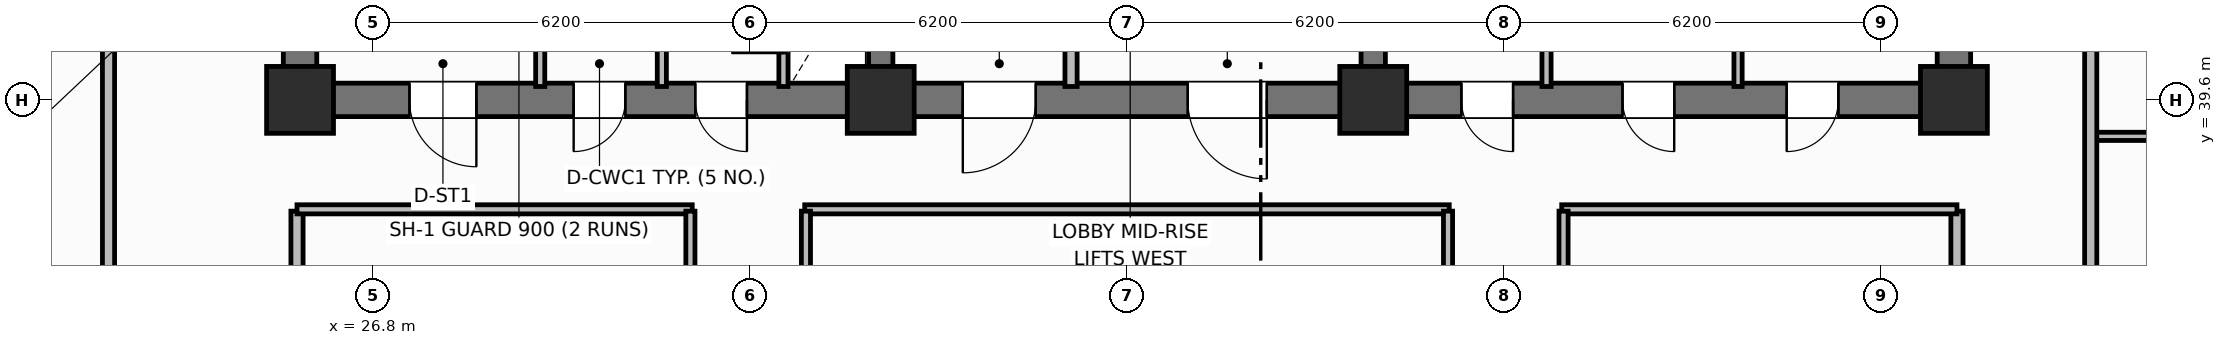
"""IFC4 building model, lengths in metres.
Left out: names, types, materials, properties, quantities, classifications, styles, units other than length and angle.
Written with IfcOpenShell. Run it as: python <this file> out.ifc"""

import sys

from ifc_helpers import new_model, si_unit, direction, frame, frame_2d, origin, origin_2d, place, context, subcontext, project, spatial, rectangle, extrude, element, fill, save


model = new_model("IFC4")
c1 = context("Model", 3, precision=1e-05, world=origin(), true_north=direction((0.0, 1.0)))
c2 = subcontext(c1, "Body", "Model", "MODEL_VIEW")
j1 = project(units=[si_unit("LENGTHUNIT", "METRE"), si_unit("PLANEANGLEUNIT", "RADIAN")], contexts=[c1])
p1 = place(None, origin())
s1 = spatial("IfcSite", under=j1, at=p1, CompositionType="ELEMENT")
p2 = place(p1, origin())
s2 = spatial("IfcBuilding", under=s1, at=p2, CompositionType="ELEMENT")
p3 = place(p2, frame((0.0, 0.0, 132.7)))
s3 = spatial("IfcBuildingStorey", under=s2, at=p3, CompositionType="ELEMENT", Elevation=132.7)
for number, where, z_axis, x_axis in (
    (1, (25.6, 39.875, 0.0), (0.0, 0.0, 1.0), (0.0, 1.0, 0.0)),
    (2, (52.8, 39.875, 0.0), (0.0, 0.0, 1.0), (0.0, 1.0, 0.0)),
):
    element("IfcWall", number, at=place(p3, frame(where, z_axis=z_axis, x_axis=x_axis)), inside=s3, PredefinedType="SHEAR", context=c2, shape_type="SweptSolid", body=[
        extrude(rectangle(XDim=5.65, YDim=0.55, at=frame_2d((2.825, 0.0))), origin(), (0.0, 0.0, 1.0), 3.7),
    ])
p4 = place(p3, frame((52.8, 39.6, 0.0), z_axis=(0.0, 0.0, 1.0), x_axis=(-1.0, 0.0, 0.0)))
e3 = element("IfcWall", 3, at=p4, inside=s3, PredefinedType="SHEAR", context=c2, shape_type="SweptSolid", body=[
    extrude(rectangle(XDim=27.2, YDim=0.55, at=frame_2d((13.6, 0.0))), origin(), (0.0, 0.0, 1.0), 3.7),
])
p5 = place(p4, frame((24.3, 0.0, 0.0)))
e4 = element("IfcOpeningElement", 4, at=p5, cuts=e3, PredefinedType="OPENING", context=c2, shape_type="SweptSolid", body=[
    extrude(rectangle(XDim=1.1, YDim=2.15, at=frame_2d((0.55, 1.075))), frame((0.0, 0.285, 0.0), z_axis=(0.0, -1.0, 0.0), x_axis=(1.0, 0.0, 0.0)), (0.0, 0.0, 1.0), 0.57),
])
p6 = place(p4, frame((21.85, 0.0, 0.0)))
e5 = element("IfcOpeningElement", 5, at=p6, cuts=e3, PredefinedType="OPENING", context=c2, shape_type="SweptSolid", body=[
    extrude(rectangle(XDim=0.85, YDim=2.1, at=frame_2d((0.425, 1.05))), frame((0.0, 0.285, 0.0), z_axis=(0.0, -1.0, 0.0), x_axis=(1.0, 0.0, 0.0)), (0.0, 0.0, 1.0), 0.57),
])
p7 = place(p4, frame((19.85, 0.0, 0.0)))
e6 = element("IfcOpeningElement", 6, at=p7, cuts=e3, PredefinedType="OPENING", context=c2, shape_type="SweptSolid", body=[
    extrude(rectangle(XDim=0.85, YDim=2.1, at=frame_2d((0.425, 1.05))), frame((0.0, 0.285, 0.0), z_axis=(0.0, -1.0, 0.0), x_axis=(1.0, 0.0, 0.0)), (0.0, 0.0, 1.0), 0.57),
])
p8 = place(p4, frame((15.1, 0.0, 0.0)))
e7 = element("IfcOpeningElement", 7, at=p8, cuts=e3, PredefinedType="OPENING", context=c2, shape_type="SweptSolid", body=[
    extrude(rectangle(XDim=1.2, YDim=2.15, at=frame_2d((0.6, 1.075))), frame((0.0, 0.285, 0.0), z_axis=(0.0, -1.0, 0.0), x_axis=(1.0, 0.0, 0.0)), (0.0, 0.0, 1.0), 0.57),
])
p9 = place(p4, frame((11.3, 0.0, 0.0)))
e8 = element("IfcOpeningElement", 8, at=p9, cuts=e3, PredefinedType="OPENING", context=c2, shape_type="SweptSolid", body=[
    extrude(rectangle(XDim=1.3, YDim=2.2, at=frame_2d((0.65, 1.1))), frame((0.0, 0.285, 0.0), z_axis=(0.0, -1.0, 0.0), x_axis=(1.0, 0.0, 0.0)), (0.0, 0.0, 1.0), 0.57),
])
p10 = place(p4, frame((7.25, 0.0, 0.0)))
e9 = element("IfcOpeningElement", 9, at=p10, cuts=e3, PredefinedType="OPENING", context=c2, shape_type="SweptSolid", body=[
    extrude(rectangle(XDim=0.85, YDim=2.1, at=frame_2d((0.425, 1.05))), frame((0.0, 0.285, 0.0), z_axis=(0.0, -1.0, 0.0), x_axis=(1.0, 0.0, 0.0)), (0.0, 0.0, 1.0), 0.57),
])
p11 = place(p4, frame((4.6, 0.0, 0.0)))
e10 = element("IfcOpeningElement", 10, at=p11, cuts=e3, PredefinedType="OPENING", context=c2, shape_type="SweptSolid", body=[
    extrude(rectangle(XDim=0.85, YDim=2.1, at=frame_2d((0.425, 1.05))), frame((0.0, 0.285, 0.0), z_axis=(0.0, -1.0, 0.0), x_axis=(1.0, 0.0, 0.0)), (0.0, 0.0, 1.0), 0.57),
])
p12 = place(p4, frame((1.9, 0.0, 0.0)))
e11 = element("IfcOpeningElement", 11, at=p12, cuts=e3, PredefinedType="OPENING", context=c2, shape_type="SweptSolid", body=[
    extrude(rectangle(XDim=0.85, YDim=2.1, at=frame_2d((0.425, 1.05))), frame((0.0, 0.285, 0.0), z_axis=(0.0, -1.0, 0.0), x_axis=(1.0, 0.0, 0.0)), (0.0, 0.0, 1.0), 0.57),
])
for number, where, z_axis, x_axis in (
    (12, (35.15, 39.875, 0.0), (0.0, 0.0, 1.0), (0.0, 1.0, 0.0)),
    (13, (43.25, 39.875, 0.0), (0.0, 0.0, 1.0), (0.0, 1.0, 0.0)),
):
    element("IfcWall", number, at=place(p3, frame(where, z_axis=z_axis, x_axis=x_axis)), inside=s3, PredefinedType="SHEAR", context=c2, shape_type="SweptSolid", body=[
        extrude(rectangle(XDim=5.65, YDim=0.4, at=frame_2d((2.825, 0.0))), origin(), (0.0, 0.0, 1.0), 3.7),
    ])
for number, where, z_axis, x_axis in (
    (14, (25.6, 39.6, 0.0), (0.0, 0.0, 1.0), (1.0, 0.0, 0.0)),
    (15, (35.15, 39.6, 0.0), (0.0, 0.0, 1.0), (1.0, 0.0, 0.0)),
    (16, (43.25, 39.6, 0.0), (0.0, 0.0, 1.0), (1.0, 0.0, 0.0)),
    (17, (52.8, 39.6, 0.0), (0.0, 0.0, 1.0), (1.0, 0.0, 0.0)),
):
    element("IfcColumn", number, at=place(p3, frame(where, z_axis=z_axis, x_axis=x_axis)), inside=s3, PredefinedType="COLUMN", context=c2, shape_type="SweptSolid", body=[
        extrude(rectangle(XDim=1.1, YDim=1.1, at=origin_2d()), origin(), (0.0, 0.0, 1.0), 3.7),
    ])
p13 = place(p3, frame((33.55, 39.82, 0.0), z_axis=(0.0, 0.0, 1.0), x_axis=(0.0, 1.0, 0.0)))
e18 = element("IfcWall", 18, at=p13, inside=s3, PredefinedType="PARTITIONING", context=c2, shape_type="SweptSolid", body=[
    extrude(rectangle(XDim=2.13, YDim=0.15, at=frame_2d((1.065, 0.0))), origin(), (0.0, 0.0, 1.0), 2.49),
])
p14 = place(p13, frame((0.55, 0.0, 0.0)))
e19 = element("IfcOpeningElement", 19, at=p14, cuts=e18, PredefinedType="OPENING", context=c2, shape_type="SweptSolid", body=[
    extrude(rectangle(XDim=0.85, YDim=2.05, at=frame_2d((0.425, 1.025))), frame((0.0, 0.085, 0.0), z_axis=(0.0, -1.0, 0.0), x_axis=(1.0, 0.0, 0.0)), (0.0, 0.0, 1.0), 0.17),
])
for number, where, z_axis, x_axis in (
    (20, (29.55, 39.82, 0.0), (0.0, 0.0, 1.0), (0.0, 1.0, 0.0)),
    (21, (31.55, 39.82, 0.0), (0.0, 0.0, 1.0), (0.0, 1.0, 0.0)),
):
    element("IfcWall", number, at=place(p3, frame(where, z_axis=z_axis, x_axis=x_axis)), inside=s3, PredefinedType="PARTITIONING", context=c2, shape_type="SweptSolid", body=[
        extrude(rectangle(XDim=2.13, YDim=0.15, at=frame_2d((1.065, 0.0))), origin(), (0.0, 0.0, 1.0), 2.49),
    ])
p15 = place(p3, frame((38.28, 39.82, 0.0), z_axis=(0.0, 0.0, 1.0), x_axis=(0.0, 1.0, 0.0)))
e22 = element("IfcWall", 22, at=p15, inside=s3, PredefinedType="PARTITIONING", context=c2, shape_type="SweptSolid", body=[
    extrude(rectangle(XDim=2.73, YDim=0.2, at=frame_2d((1.365, 0.0))), origin(), (0.0, 0.0, 1.0), 2.49),
])
p16 = place(p3, frame((46.1, 39.82, 0.0), z_axis=(0.0, 0.0, 1.0), x_axis=(0.0, 1.0, 0.0)))
e23 = element("IfcWall", 23, at=p16, inside=s3, PredefinedType="PARTITIONING", context=c2, shape_type="SweptSolid", body=[
    extrude(rectangle(XDim=2.73, YDim=0.15, at=frame_2d((1.365, 0.0))), origin(), (0.0, 0.0, 1.0), 2.49),
])
p17 = place(p3, frame((49.25, 39.82, 0.0), z_axis=(0.0, 0.0, 1.0), x_axis=(0.0, 1.0, 0.0)))
e24 = element("IfcWall", 24, at=p17, inside=s3, PredefinedType="PARTITIONING", context=c2, shape_type="SweptSolid", body=[
    extrude(rectangle(XDim=2.73, YDim=0.135, at=frame_2d((1.365, 0.0))), origin(), (0.0, 0.0, 1.0), 2.49),
])
for number, where, z_axis, x_axis in (
    (25, (25.55, 18.63, 0.0), (0.0, 0.0, 1.0), (0.0, 1.0, 0.0)),
    (26, (52.85, 18.63, 0.0), (0.0, 0.0, 1.0), (0.0, 1.0, 0.0)),
):
    element("IfcWall", number, at=place(p3, frame(where, z_axis=z_axis, x_axis=x_axis)), inside=s3, PredefinedType="PARTITIONING", context=c2, shape_type="SweptSolid", body=[
        extrude(rectangle(XDim=19.14, YDim=0.2, at=frame_2d((9.57, 0.0))), origin(), (0.0, 0.0, 1.0), 2.49),
    ])
p18 = place(p3, frame((25.55, 37.8, 0.0), z_axis=(0.0, 0.0, 1.0), x_axis=(1.0, 0.0, 0.0)))
e27 = element("IfcWall", 27, at=p18, inside=s3, PredefinedType="PARTITIONING", context=c2, shape_type="SweptSolid", body=[
    extrude(rectangle(XDim=6.5, YDim=0.15, at=frame_2d((3.25, 0.0))), origin(), (0.0, 0.0, 1.0), 2.49),
])
p19 = place(p3, frame((33.9, 37.8, 0.0), z_axis=(0.0, 0.0, 1.0), x_axis=(1.0, 0.0, 0.0)))
e28 = element("IfcWall", 28, at=p19, inside=s3, PredefinedType="PARTITIONING", context=c2, shape_type="SweptSolid", body=[
    extrude(rectangle(XDim=10.6, YDim=0.15, at=frame_2d((5.3, 0.0))), origin(), (0.0, 0.0, 1.0), 2.49),
])
p20 = place(p3, frame((46.35, 37.8, 0.0), z_axis=(0.0, 0.0, 1.0), x_axis=(1.0, 0.0, 0.0)))
e29 = element("IfcWall", 29, at=p20, inside=s3, PredefinedType="PARTITIONING", context=c2, shape_type="SweptSolid", body=[
    extrude(rectangle(XDim=6.5, YDim=0.15, at=frame_2d((3.25, 0.0))), origin(), (0.0, 0.0, 1.0), 2.49),
])
p21 = place(p3, frame((32.02, 18.63, 0.0), z_axis=(0.0, 0.0, 1.0), x_axis=(0.0, 1.0, 0.0)))
e30 = element("IfcWall", 30, at=p21, inside=s3, PredefinedType="PARTITIONING", context=c2, shape_type="SweptSolid", body=[
    extrude(rectangle(XDim=19.14, YDim=0.15, at=frame_2d((9.57, 0.0))), origin(), (0.0, 0.0, 1.0), 2.49),
])
p22 = place(p21, frame((5.0, 0.0, 0.0)))
e31 = element("IfcOpeningElement", 31, at=p22, cuts=e30, PredefinedType="OPENING", context=c2, shape_type="SweptSolid", body=[
    extrude(rectangle(XDim=0.9, YDim=2.1, at=frame_2d((0.45, 1.05))), frame((0.0, 0.085, 0.0), z_axis=(0.0, -1.0, 0.0), x_axis=(1.0, 0.0, 0.0)), (0.0, 0.0, 1.0), 0.17),
])
p23 = place(p3, frame((33.92, 18.63, 0.0), z_axis=(0.0, 0.0, 1.0), x_axis=(0.0, 1.0, 0.0)))
e32 = element("IfcWall", 32, at=p23, inside=s3, PredefinedType="PARTITIONING", context=c2, shape_type="SweptSolid", body=[
    extrude(rectangle(XDim=19.14, YDim=0.15, at=frame_2d((9.57, 0.0))), origin(), (0.0, 0.0, 1.0), 2.49),
])
p24 = place(p23, frame((6.5, 0.0, 0.0)))
e33 = element("IfcOpeningElement", 33, at=p24, cuts=e32, PredefinedType="OPENING", context=c2, shape_type="SweptSolid", body=[
    extrude(rectangle(XDim=1.0, YDim=2.15, at=frame_2d((0.5, 1.075))), frame((0.0, 0.085, 0.0), z_axis=(0.0, -1.0, 0.0), x_axis=(1.0, 0.0, 0.0)), (0.0, 0.0, 1.0), 0.17),
])
p25 = place(p3, frame((44.48, 18.63, 0.0), z_axis=(0.0, 0.0, 1.0), x_axis=(0.0, 1.0, 0.0)))
e34 = element("IfcWall", 34, at=p25, inside=s3, PredefinedType="PARTITIONING", context=c2, shape_type="SweptSolid", body=[
    extrude(rectangle(XDim=19.14, YDim=0.15, at=frame_2d((9.57, 0.0))), origin(), (0.0, 0.0, 1.0), 2.49),
])
p26 = place(p3, frame((46.38, 18.63, 0.0), z_axis=(0.0, 0.0, 1.0), x_axis=(0.0, 1.0, 0.0)))
e35 = element("IfcWall", 35, at=p26, inside=s3, PredefinedType="PARTITIONING", context=c2, shape_type="SweptSolid", body=[
    extrude(rectangle(XDim=19.14, YDim=0.15, at=frame_2d((9.57, 0.0))), origin(), (0.0, 0.0, 1.0), 2.49),
])
p27 = place(p26, frame((3.0, 0.0, 0.0)))
e36 = element("IfcOpeningElement", 36, at=p27, cuts=e35, PredefinedType="OPENING", context=c2, shape_type="SweptSolid", body=[
    extrude(rectangle(XDim=0.9, YDim=2.1, at=frame_2d((0.45, 1.05))), frame((0.0, 0.085, 0.0), z_axis=(0.0, -1.0, 0.0), x_axis=(1.0, 0.0, 0.0)), (0.0, 0.0, 1.0), 0.17),
])
p28 = place(p26, frame((11.5, 0.0, 0.0)))
e37 = element("IfcOpeningElement", 37, at=p28, cuts=e35, PredefinedType="OPENING", context=c2, shape_type="SweptSolid", body=[
    extrude(rectangle(XDim=0.9, YDim=2.1, at=frame_2d((0.45, 1.05))), frame((0.0, 0.085, 0.0), z_axis=(0.0, -1.0, 0.0), x_axis=(1.0, 0.0, 0.0)), (0.0, 0.0, 1.0), 0.17),
])
p29 = place(p3, frame((22.45, 10.6, 0.0), z_axis=(0.0, 0.0, 1.0), x_axis=(0.0, 1.0, 0.0)))
e38 = element("IfcWall", 38, at=p29, inside=s3, PredefinedType="PARTITIONING", context=c2, shape_type="SweptSolid", body=[
    extrude(rectangle(XDim=35.2, YDim=0.2, at=frame_2d((17.6, 0.0))), origin(), (0.0, 0.0, 1.0), 2.49),
])
p30 = place(p29, frame((2.65, 0.0, 0.0)))
e39 = element("IfcOpeningElement", 39, at=p30, cuts=e38, PredefinedType="OPENING", context=c2, shape_type="SweptSolid", body=[
    extrude(rectangle(XDim=1.0, YDim=2.15, at=frame_2d((0.5, 1.075))), frame((0.0, 0.11, 0.0), z_axis=(0.0, -1.0, 0.0), x_axis=(1.0, 0.0, 0.0)), (0.0, 0.0, 1.0), 0.22),
])
p31 = place(p29, frame((19.95, 0.0, 0.0)))
e40 = element("IfcOpeningElement", 40, at=p31, cuts=e38, PredefinedType="OPENING", context=c2, shape_type="SweptSolid", body=[
    extrude(rectangle(XDim=1.0, YDim=2.15, at=frame_2d((0.5, 1.075))), frame((0.0, 0.11, 0.0), z_axis=(0.0, -1.0, 0.0), x_axis=(1.0, 0.0, 0.0)), (0.0, 0.0, 1.0), 0.22),
])
p32 = place(p3, frame((55.05, 39.0, 0.0), z_axis=(0.0, 0.0, 1.0), x_axis=(1.0, 0.0, 0.0)))
e41 = element("IfcWall", 41, at=p32, inside=s3, PredefinedType="PARTITIONING", context=c2, shape_type="SweptSolid", body=[
    extrude(rectangle(XDim=2.25, YDim=0.135, at=frame_2d((1.125, 0.0))), origin(), (0.0, 0.0, 1.0), 2.49),
])
p33 = place(p3, frame((55.05, 10.6, 0.0), z_axis=(0.0, 0.0, 1.0), x_axis=(0.0, 1.0, 0.0)))
e42 = element("IfcWall", 42, at=p33, inside=s3, PredefinedType="PARTITIONING", context=c2, shape_type="SweptSolid", body=[
    extrude(rectangle(XDim=35.2, YDim=0.2, at=frame_2d((17.6, 0.0))), origin(), (0.0, 0.0, 1.0), 2.49),
])
p34 = place(p33, frame((2.65, 0.0, 0.0)))
e43 = element("IfcOpeningElement", 43, at=p34, cuts=e42, PredefinedType="OPENING", context=c2, shape_type="SweptSolid", body=[
    extrude(rectangle(XDim=1.0, YDim=2.15, at=frame_2d((0.5, 1.075))), frame((0.0, 0.11, 0.0), z_axis=(0.0, -1.0, 0.0), x_axis=(1.0, 0.0, 0.0)), (0.0, 0.0, 1.0), 0.22),
])
p35 = place(p33, frame((22.75, 0.0, 0.0)))
e44 = element("IfcOpeningElement", 44, at=p35, cuts=e42, PredefinedType="OPENING", context=c2, shape_type="SweptSolid", body=[
    extrude(rectangle(XDim=1.0, YDim=2.15, at=frame_2d((0.5, 1.075))), frame((0.0, 0.11, 0.0), z_axis=(0.0, -1.0, 0.0), x_axis=(1.0, 0.0, 0.0)), (0.0, 0.0, 1.0), 0.22),
])
p36 = place(p14, origin())
e45 = element("IfcDoor", 45, at=p36, inside=s3, OperationType="SINGLE_SWING_LEFT", PredefinedType="TRAPDOOR", context=c2, shape_type="SweptSolid", body=[
    extrude(rectangle(XDim=0.85, YDim=2.05, at=frame_2d((0.425, 1.025))), frame((0.0, 0.025, 0.0), z_axis=(0.0, -1.0, 0.0), x_axis=(1.0, 0.0, 0.0)), (0.0, 0.0, 1.0), 0.05),
])
fill(e19, e45)
p37 = place(p5, origin())
e46 = element("IfcDoor", 46, at=p37, inside=s3, OperationType="SINGLE_SWING_LEFT", PredefinedType="DOOR", context=c2, shape_type="SweptSolid", body=[
    extrude(rectangle(XDim=1.1, YDim=2.15, at=frame_2d((0.55, 1.075))), frame((0.0, 0.025, 0.0), z_axis=(0.0, -1.0, 0.0), x_axis=(1.0, 0.0, 0.0)), (0.0, 0.0, 1.0), 0.05),
])
fill(e4, e46)
p38 = place(p6, origin())
e47 = element("IfcDoor", 47, at=p38, inside=s3, OperationType="SINGLE_SWING_RIGHT", PredefinedType="DOOR", context=c2, shape_type="SweptSolid", body=[
    extrude(rectangle(XDim=0.85, YDim=2.1, at=frame_2d((0.425, 1.05))), frame((0.0, 0.025, 0.0), z_axis=(0.0, -1.0, 0.0), x_axis=(1.0, 0.0, 0.0)), (0.0, 0.0, 1.0), 0.05),
])
fill(e5, e47)
p39 = place(p7, origin())
e48 = element("IfcDoor", 48, at=p39, inside=s3, OperationType="SINGLE_SWING_LEFT", PredefinedType="DOOR", context=c2, shape_type="SweptSolid", body=[
    extrude(rectangle(XDim=0.85, YDim=2.1, at=frame_2d((0.425, 1.05))), frame((0.0, 0.025, 0.0), z_axis=(0.0, -1.0, 0.0), x_axis=(1.0, 0.0, 0.0)), (0.0, 0.0, 1.0), 0.05),
])
fill(e6, e48)
p40 = place(p8, origin())
e49 = element("IfcDoor", 49, at=p40, inside=s3, OperationType="SINGLE_SWING_RIGHT", PredefinedType="DOOR", context=c2, shape_type="SweptSolid", body=[
    extrude(rectangle(XDim=1.2, YDim=2.15, at=frame_2d((0.6, 1.075))), frame((0.0, 0.025, 0.0), z_axis=(0.0, -1.0, 0.0), x_axis=(1.0, 0.0, 0.0)), (0.0, 0.0, 1.0), 0.05),
])
fill(e7, e49)
p41 = place(p9, origin())
e50 = element("IfcDoor", 50, at=p41, inside=s3, OperationType="SINGLE_SWING_LEFT", PredefinedType="DOOR", context=c2, shape_type="SweptSolid", body=[
    extrude(rectangle(XDim=1.3, YDim=2.2, at=frame_2d((0.65, 1.1))), frame((0.0, 0.025, 0.0), z_axis=(0.0, -1.0, 0.0), x_axis=(1.0, 0.0, 0.0)), (0.0, 0.0, 1.0), 0.05),
])
fill(e8, e50)
p42 = place(p10, origin())
e51 = element("IfcDoor", 51, at=p42, inside=s3, OperationType="SINGLE_SWING_LEFT", PredefinedType="DOOR", context=c2, shape_type="SweptSolid", body=[
    extrude(rectangle(XDim=0.85, YDim=2.1, at=frame_2d((0.425, 1.05))), frame((0.0, 0.025, 0.0), z_axis=(0.0, -1.0, 0.0), x_axis=(1.0, 0.0, 0.0)), (0.0, 0.0, 1.0), 0.05),
])
fill(e9, e51)
p43 = place(p11, origin())
e52 = element("IfcDoor", 52, at=p43, inside=s3, OperationType="SINGLE_SWING_LEFT", PredefinedType="DOOR", context=c2, shape_type="SweptSolid", body=[
    extrude(rectangle(XDim=0.85, YDim=2.1, at=frame_2d((0.425, 1.05))), frame((0.0, 0.025, 0.0), z_axis=(0.0, -1.0, 0.0), x_axis=(1.0, 0.0, 0.0)), (0.0, 0.0, 1.0), 0.05),
])
fill(e10, e52)
p44 = place(p12, origin())
e53 = element("IfcDoor", 53, at=p44, inside=s3, OperationType="SINGLE_SWING_RIGHT", PredefinedType="DOOR", context=c2, shape_type="SweptSolid", body=[
    extrude(rectangle(XDim=0.85, YDim=2.1, at=frame_2d((0.425, 1.05))), frame((0.0, 0.025, 0.0), z_axis=(0.0, -1.0, 0.0), x_axis=(1.0, 0.0, 0.0)), (0.0, 0.0, 1.0), 0.05),
])
fill(e11, e53)
save(model, sys.argv[1])
